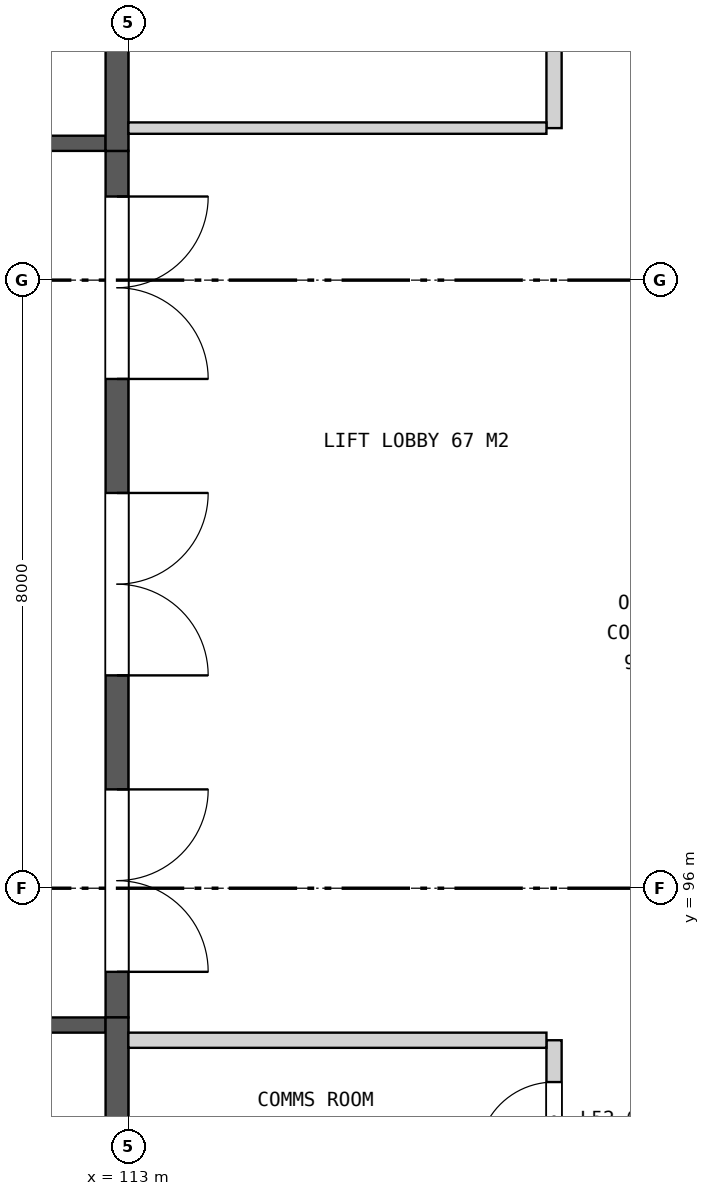
"""IFC4 building model, lengths in metres.
Left out: names, types, materials, properties, quantities, classifications, styles, units other than length and angle.
Written with IfcOpenShell. Run it as: python <this file> out.ifc"""

import sys

from ifc_helpers import new_model, si_unit, direction, frame, frame_2d, origin, place, context, subcontext, project, spatial, rectangle, extrude, element, fill, save


model = new_model("IFC4")
c1 = context("Model", 3, precision=1e-05, world=origin(), true_north=direction((0.0, 1.0)))
c2 = subcontext(c1, "Body", "Model", "MODEL_VIEW")
j1 = project(units=[si_unit("LENGTHUNIT", "METRE"), si_unit("PLANEANGLEUNIT", "RADIAN")], contexts=[c1])
p1 = place(None, origin())
s1 = spatial("IfcSite", under=j1, at=p1, CompositionType="ELEMENT")
p2 = place(p1, origin())
s2 = spatial("IfcBuilding", under=s1, at=p2, CompositionType="ELEMENT")
p3 = place(p2, frame((0.0, 0.0, 245.1)))
s3 = spatial("IfcBuildingStorey", under=s2, at=p3, CompositionType="ELEMENT", Elevation=245.1)
p4 = place(p3, frame((112.85, 105.7, 0.0), z_axis=(0.0, 0.0, 1.0), x_axis=(0.0, -1.0, 0.0)))
e1 = element("IfcWall", 1, at=p4, inside=s3, PredefinedType="SHEAR", context=c2, shape_type="SweptSolid", body=[
    extrude(rectangle(XDim=11.4, YDim=0.3, at=frame_2d((5.7, 0.0))), origin(), (0.0, 0.0, 1.0), 4.2),
])
p5 = place(p4, frame((0.6, 0.0, 0.0)))
e2 = element("IfcOpeningElement", 2, at=p5, cuts=e1, PredefinedType="OPENING", context=c2, shape_type="SweptSolid", body=[
    extrude(rectangle(XDim=2.4, YDim=2.4, at=frame_2d((1.2, 1.2))), frame((0.0, 0.16, 0.0), z_axis=(0.0, -1.0, 0.0), x_axis=(1.0, 0.0, 0.0)), (0.0, 0.0, 1.0), 0.32),
])
p6 = place(p4, frame((4.5, 0.0, 0.0)))
e3 = element("IfcOpeningElement", 3, at=p6, cuts=e1, PredefinedType="OPENING", context=c2, shape_type="SweptSolid", body=[
    extrude(rectangle(XDim=2.4, YDim=2.4, at=frame_2d((1.2, 1.2))), frame((0.0, 0.16, 0.0), z_axis=(0.0, -1.0, 0.0), x_axis=(1.0, 0.0, 0.0)), (0.0, 0.0, 1.0), 0.32),
])
p7 = place(p4, frame((8.4, 0.0, 0.0)))
e4 = element("IfcOpeningElement", 4, at=p7, cuts=e1, PredefinedType="OPENING", context=c2, shape_type="SweptSolid", body=[
    extrude(rectangle(XDim=2.4, YDim=2.4, at=frame_2d((1.2, 1.2))), frame((0.0, 0.16, 0.0), z_axis=(0.0, -1.0, 0.0), x_axis=(1.0, 0.0, 0.0)), (0.0, 0.0, 1.0), 0.32),
])
p8 = place(p3, frame((112.7, 94.2, 0.0), z_axis=(0.0, 0.0, 1.0), x_axis=(-1.0, 0.0, 0.0)))
e5 = element("IfcWall", 5, at=p8, inside=s3, PredefinedType="SHEAR", context=c2, shape_type="SweptSolid", body=[
    extrude(rectangle(XDim=15.45, YDim=0.2, at=frame_2d((7.725, 0.0))), origin(), (0.0, 0.0, 1.0), 4.2),
])
p9 = place(p8, frame((0.95, 0.0, 0.0)))
e6 = element("IfcOpeningElement", 6, at=p9, cuts=e5, PredefinedType="OPENING", context=c2, shape_type="SweptSolid", body=[
    extrude(rectangle(XDim=1.1, YDim=2.1, at=frame_2d((0.55, 1.05))), frame((0.0, 0.11, 0.0), z_axis=(0.0, -1.0, 0.0), x_axis=(1.0, 0.0, 0.0)), (0.0, 0.0, 1.0), 0.22),
])
p10 = place(p3, frame((112.85, 94.3, 0.0), z_axis=(0.0, 0.0, 1.0), x_axis=(0.0, -1.0, 0.0)))
e7 = element("IfcWall", 7, at=p10, inside=s3, PredefinedType="SHEAR", context=c2, shape_type="SweptSolid", body=[
    extrude(rectangle(XDim=6.05, YDim=0.3, at=frame_2d((3.025, 0.0))), origin(), (0.0, 0.0, 1.0), 4.2),
])
p11 = place(p3, frame((112.7, 105.8, 0.0), z_axis=(0.0, 0.0, 1.0), x_axis=(-1.0, 0.0, 0.0)))
e8 = element("IfcWall", 8, at=p11, inside=s3, PredefinedType="SHEAR", context=c2, shape_type="SweptSolid", body=[
    extrude(rectangle(XDim=15.45, YDim=0.2, at=frame_2d((7.725, 0.0))), origin(), (0.0, 0.0, 1.0), 4.2),
])
p12 = place(p11, frame((0.95, 0.0, 0.0)))
e9 = element("IfcOpeningElement", 9, at=p12, cuts=e8, PredefinedType="OPENING", context=c2, shape_type="SweptSolid", body=[
    extrude(rectangle(XDim=1.1, YDim=2.1, at=frame_2d((0.55, 1.05))), frame((0.0, 0.11, 0.0), z_axis=(0.0, -1.0, 0.0), x_axis=(1.0, 0.0, 0.0)), (0.0, 0.0, 1.0), 0.22),
])
p13 = place(p3, frame((112.85, 111.75, 0.0), z_axis=(0.0, 0.0, 1.0), x_axis=(0.0, -1.0, 0.0)))
e10 = element("IfcWall", 10, at=p13, inside=s3, PredefinedType="SHEAR", context=c2, shape_type="SweptSolid", body=[
    extrude(rectangle(XDim=6.05, YDim=0.3, at=frame_2d((3.025, 0.0))), origin(), (0.0, 0.0, 1.0), 4.2),
])
p14 = place(p3, frame((118.6, 80.075, 0.0), z_axis=(0.0, 0.0, 1.0), x_axis=(0.0, 1.0, 0.0)))
e11 = element("IfcWall", 11, at=p14, inside=s3, PredefinedType="SOLIDWALL", context=c2, shape_type="SweptSolid", body=[
    extrude(rectangle(XDim=13.925, YDim=0.2, at=frame_2d((6.962, 0.0))), origin(), (0.0, 0.0, 1.0), 3.443),
])
p15 = place(p14, frame((12.375, 0.0, 0.0)))
e12 = element("IfcOpeningElement", 12, at=p15, cuts=e11, PredefinedType="OPENING", context=c2, shape_type="SweptSolid", body=[
    extrude(rectangle(XDim=1.0, YDim=2.1, at=frame_2d((0.5, 1.05))), frame((0.0, 0.11, 0.0), z_axis=(0.0, -1.0, 0.0), x_axis=(1.0, 0.0, 0.0)), (0.0, 0.0, 1.0), 0.22),
])
p16 = place(p14, frame((10.375, 0.0, 0.0)))
e13 = element("IfcOpeningElement", 13, at=p16, cuts=e11, PredefinedType="OPENING", context=c2, shape_type="SweptSolid", body=[
    extrude(rectangle(XDim=1.0, YDim=2.1, at=frame_2d((0.5, 1.05))), frame((0.0, 0.11, 0.0), z_axis=(0.0, -1.0, 0.0), x_axis=(1.0, 0.0, 0.0)), (0.0, 0.0, 1.0), 0.22),
])
p17 = place(p14, frame((8.375, 0.0, 0.0)))
e14 = element("IfcOpeningElement", 14, at=p17, cuts=e11, PredefinedType="OPENING", context=c2, shape_type="SweptSolid", body=[
    extrude(rectangle(XDim=1.0, YDim=2.1, at=frame_2d((0.5, 1.05))), frame((0.0, 0.11, 0.0), z_axis=(0.0, -1.0, 0.0), x_axis=(1.0, 0.0, 0.0)), (0.0, 0.0, 1.0), 0.22),
])
p18 = place(p14, frame((3.45, 0.0, 0.0)))
e15 = element("IfcOpeningElement", 15, at=p18, cuts=e11, PredefinedType="OPENING", context=c2, shape_type="SweptSolid", body=[
    extrude(rectangle(XDim=1.0, YDim=2.1, at=frame_2d((0.5, 1.05))), frame((0.0, 0.11, 0.0), z_axis=(0.0, -1.0, 0.0), x_axis=(1.0, 0.0, 0.0)), (0.0, 0.0, 1.0), 0.22),
])
p19 = place(p3, frame((118.6, 106.0, 0.0), z_axis=(0.0, 0.0, 1.0), x_axis=(0.0, 1.0, 0.0)))
e16 = element("IfcWall", 16, at=p19, inside=s3, PredefinedType="SOLIDWALL", context=c2, shape_type="SweptSolid", body=[
    extrude(rectangle(XDim=13.925, YDim=0.2, at=frame_2d((6.962, 0.0))), origin(), (0.0, 0.0, 1.0), 3.443),
])
p20 = place(p19, frame((1.45, 0.0, 0.0)))
e17 = element("IfcOpeningElement", 17, at=p20, cuts=e16, PredefinedType="OPENING", context=c2, shape_type="SweptSolid", body=[
    extrude(rectangle(XDim=1.0, YDim=2.1, at=frame_2d((0.5, 1.05))), frame((0.0, 0.11, 0.0), z_axis=(0.0, -1.0, 0.0), x_axis=(1.0, 0.0, 0.0)), (0.0, 0.0, 1.0), 0.22),
])
p21 = place(p19, frame((4.45, 0.0, 0.0)))
e18 = element("IfcOpeningElement", 18, at=p21, cuts=e16, PredefinedType="OPENING", context=c2, shape_type="SweptSolid", body=[
    extrude(rectangle(XDim=1.0, YDim=2.1, at=frame_2d((0.5, 1.05))), frame((0.0, 0.11, 0.0), z_axis=(0.0, -1.0, 0.0), x_axis=(1.0, 0.0, 0.0)), (0.0, 0.0, 1.0), 0.22),
])
p22 = place(p19, frame((9.45, 0.0, 0.0)))
e19 = element("IfcOpeningElement", 19, at=p22, cuts=e16, PredefinedType="OPENING", context=c2, shape_type="SweptSolid", body=[
    extrude(rectangle(XDim=1.0, YDim=2.1, at=frame_2d((0.5, 1.05))), frame((0.0, 0.11, 0.0), z_axis=(0.0, -1.0, 0.0), x_axis=(1.0, 0.0, 0.0)), (0.0, 0.0, 1.0), 0.22),
])
p23 = place(p3, frame((113.0, 94.0, 0.0), z_axis=(0.0, 0.0, 1.0), x_axis=(1.0, 0.0, 0.0)))
e20 = element("IfcWall", 20, at=p23, inside=s3, PredefinedType="SOLIDWALL", context=c2, shape_type="SweptSolid", body=[
    extrude(rectangle(XDim=5.5, YDim=0.2, at=frame_2d((2.75, 0.0))), origin(), (0.0, 0.0, 1.0), 3.443),
])
p24 = place(p3, frame((113.0, 106.0, 0.0), z_axis=(0.0, 0.0, 1.0), x_axis=(1.0, 0.0, 0.0)))
e21 = element("IfcWall", 21, at=p24, inside=s3, PredefinedType="PARTITIONING", context=c2, shape_type="SweptSolid", body=[
    extrude(rectangle(XDim=5.5, YDim=0.15, at=frame_2d((2.75, 0.0))), origin(), (0.0, 0.0, 1.0), 3.443),
])
p25 = place(p5, origin())
e22 = element("IfcDoor", 22, at=p25, inside=s3, OperationType="DOUBLE_DOOR_SINGLE_SWING", PredefinedType="DOOR", context=c2, shape_type="SweptSolid", body=[
    extrude(rectangle(XDim=2.4, YDim=2.4, at=frame_2d((1.2, 1.2))), frame((0.0, 0.025, 0.0), z_axis=(0.0, -1.0, 0.0), x_axis=(1.0, 0.0, 0.0)), (0.0, 0.0, 1.0), 0.05),
])
fill(e2, e22)
p26 = place(p6, origin())
e23 = element("IfcDoor", 23, at=p26, inside=s3, OperationType="DOUBLE_DOOR_SINGLE_SWING", PredefinedType="DOOR", context=c2, shape_type="SweptSolid", body=[
    extrude(rectangle(XDim=2.4, YDim=2.4, at=frame_2d((1.2, 1.2))), frame((0.0, 0.025, 0.0), z_axis=(0.0, -1.0, 0.0), x_axis=(1.0, 0.0, 0.0)), (0.0, 0.0, 1.0), 0.05),
])
fill(e3, e23)
p27 = place(p7, origin())
e24 = element("IfcDoor", 24, at=p27, inside=s3, OperationType="DOUBLE_DOOR_SINGLE_SWING", PredefinedType="DOOR", context=c2, shape_type="SweptSolid", body=[
    extrude(rectangle(XDim=2.4, YDim=2.4, at=frame_2d((1.2, 1.2))), frame((0.0, 0.025, 0.0), z_axis=(0.0, -1.0, 0.0), x_axis=(1.0, 0.0, 0.0)), (0.0, 0.0, 1.0), 0.05),
])
fill(e4, e24)
p28 = place(p15, origin())
e25 = element("IfcDoor", 25, at=p28, inside=s3, OperationType="SINGLE_SWING_LEFT", PredefinedType="DOOR", context=c2, shape_type="SweptSolid", body=[
    extrude(rectangle(XDim=1.0, YDim=2.1, at=frame_2d((0.5, 1.05))), frame((0.0, 0.025, 0.0), z_axis=(0.0, -1.0, 0.0), x_axis=(1.0, 0.0, 0.0)), (0.0, 0.0, 1.0), 0.05),
])
fill(e12, e25)
save(model, sys.argv[1])
